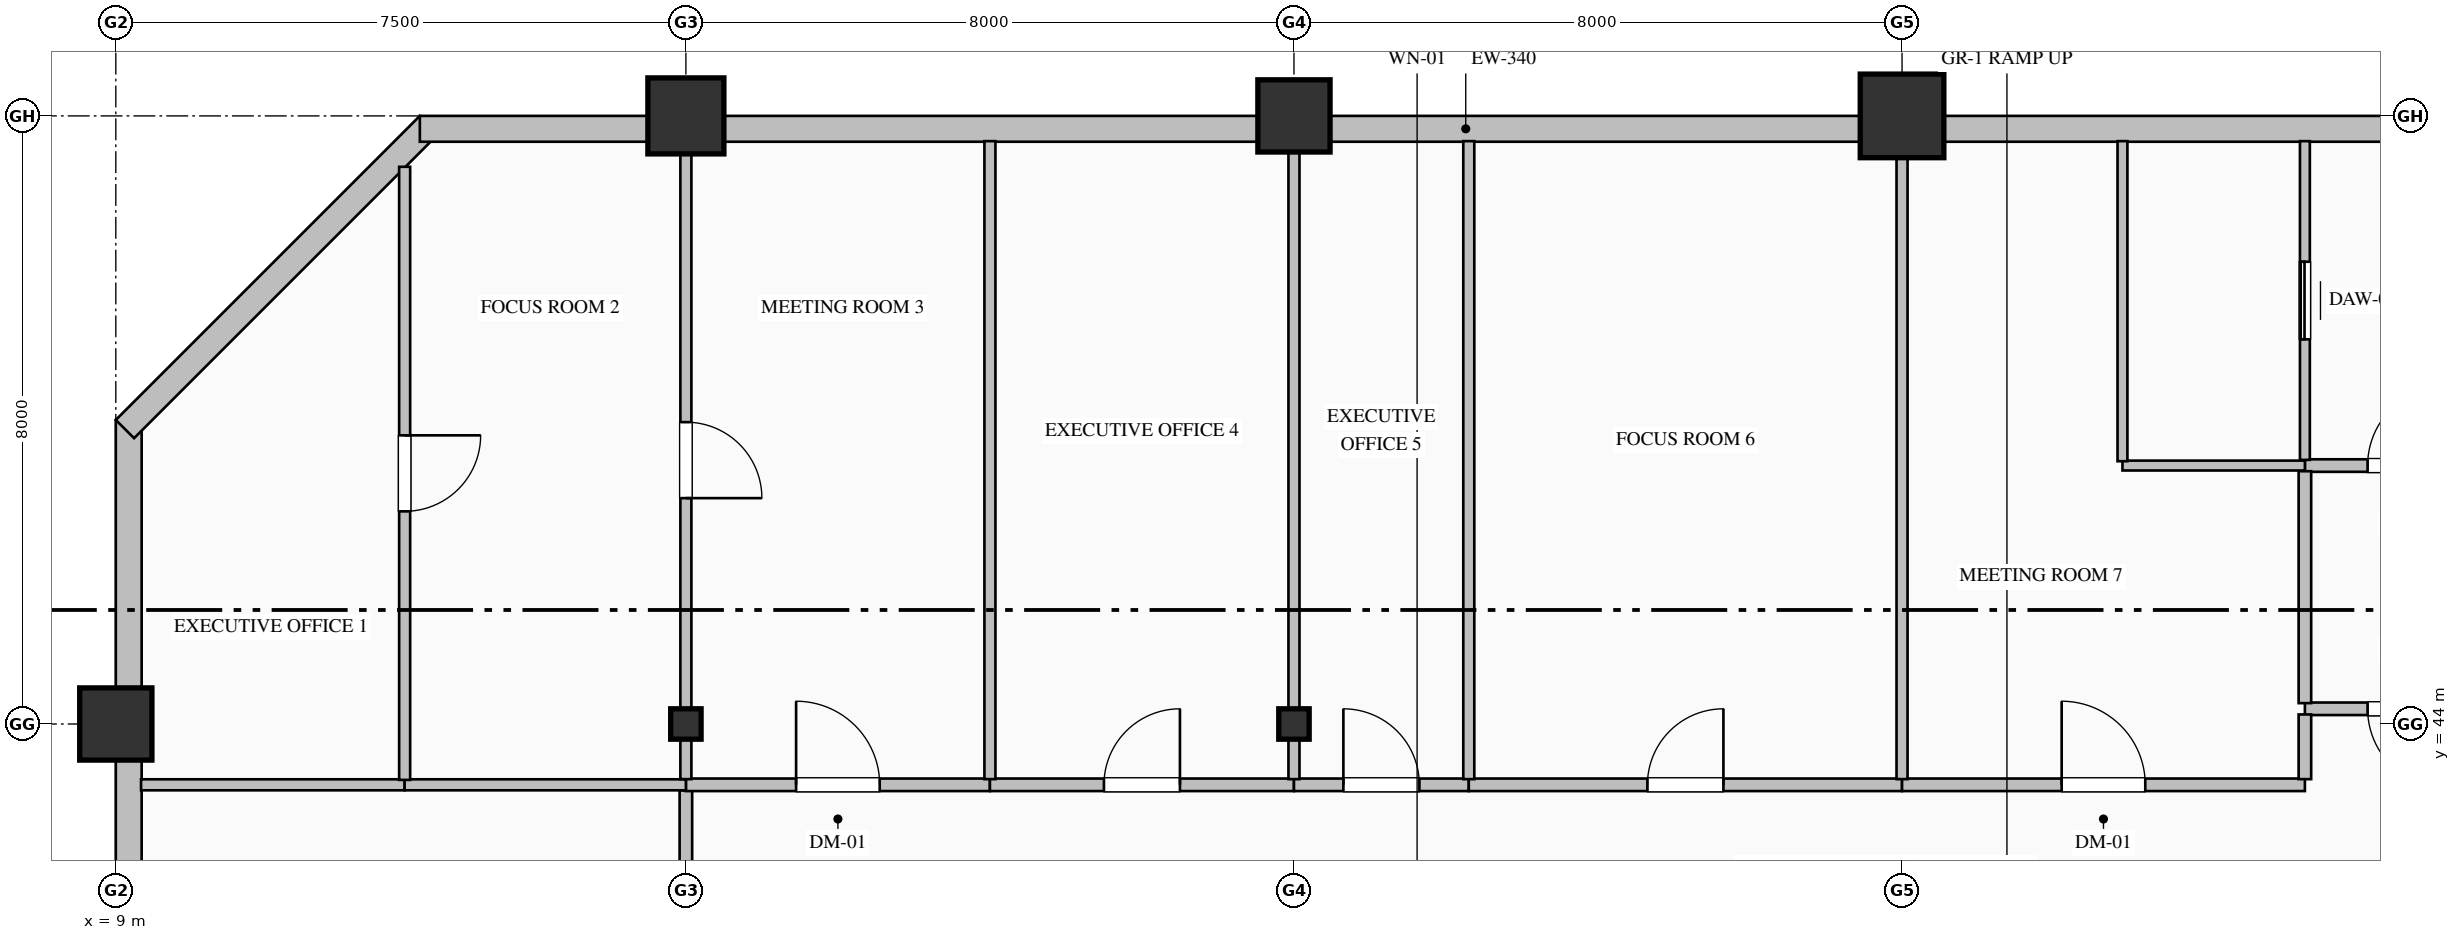
"""IFC4 building model, lengths in metres.
Left out: names, types, materials, properties, quantities, classifications, styles, units other than length and angle.
Written with IfcOpenShell. Run it as: python <this file> out.ifc"""

import sys

from ifc_helpers import new_model, si_unit, direction, frame, frame_2d, origin, origin_2d, place, context, subcontext, project, spatial, rectangle, hollow_rectangle, hollow_circle, i_section, extrude, element, fill, save


model = new_model("IFC4")
c1 = context("Model", 3, precision=1e-05, world=origin(), true_north=direction((0.0, 1.0)))
c2 = subcontext(c1, "Body", "Model", "MODEL_VIEW")
j1 = project(units=[si_unit("LENGTHUNIT", "METRE"), si_unit("PLANEANGLEUNIT", "RADIAN")], contexts=[c1])
p1 = place(None, origin())
s1 = spatial("IfcSite", under=j1, at=p1, CompositionType="ELEMENT")
p2 = place(p1, origin())
s2 = spatial("IfcBuilding", under=s1, at=p2, CompositionType="ELEMENT")
p3 = place(p2, frame((0.0, 0.0, 119.0)))
s3 = spatial("IfcBuildingStorey", under=s2, at=p3, CompositionType="ELEMENT", Elevation=119.0)
p4 = place(p3, frame((9.0, 44.0, 0.0), z_axis=(0.0, 0.0, 1.0), x_axis=(1.0, 0.0, 0.0)))
e1 = element("IfcColumn", 1, at=p4, inside=s3, PredefinedType="COLUMN", context=c2, shape_type="SweptSolid", body=[
    extrude(hollow_rectangle(XDim=0.95, YDim=0.95, WallThickness=0.036, at=origin_2d()), origin(), (0.0, 0.0, 1.0), 4.0),
])
p5 = place(p3, frame((16.5, 44.0, 0.0), z_axis=(0.0, 0.0, 1.0), x_axis=(1.0, 0.0, 0.0)))
e2 = element("IfcColumn", 2, at=p5, inside=s3, PredefinedType="COLUMN", context=c2, shape_type="SweptSolid", body=[
    extrude(i_section(OverallWidth=0.4, OverallDepth=0.4, WebThickness=0.013, FlangeThickness=0.021, FilletRadius=0.022, at=origin_2d()), origin(), (0.0, 0.0, 1.0), 4.0),
])
p6 = place(p3, frame((16.5, 52.0, 0.0), z_axis=(0.0, 0.0, 1.0), x_axis=(1.0, 0.0, 0.0)))
e3 = element("IfcColumn", 3, at=p6, inside=s3, PredefinedType="COLUMN", context=c2, shape_type="SweptSolid", body=[
    extrude(hollow_circle(Radius=0.5, WallThickness=0.036, at=origin_2d()), origin(), (0.0, 0.0, 1.0), 4.0),
])
p7 = place(p3, frame((24.5, 44.0, 0.0), z_axis=(0.0, 0.0, 1.0), x_axis=(1.0, 0.0, 0.0)))
e4 = element("IfcColumn", 4, at=p7, inside=s3, PredefinedType="COLUMN", context=c2, shape_type="SweptSolid", body=[
    extrude(i_section(OverallWidth=0.4, OverallDepth=0.4, WebThickness=0.013, FlangeThickness=0.021, FilletRadius=0.022, at=origin_2d()), origin(), (0.0, 0.0, 1.0), 4.0),
])
p8 = place(p3, frame((24.5, 52.0, 0.0), z_axis=(0.0, 0.0, 1.0), x_axis=(1.0, 0.0, 0.0)))
e5 = element("IfcColumn", 5, at=p8, inside=s3, PredefinedType="COLUMN", context=c2, shape_type="SweptSolid", body=[
    extrude(hollow_rectangle(XDim=0.95, YDim=0.95, WallThickness=0.036, at=origin_2d()), origin(), (0.0, 0.0, 1.0), 4.0),
])
p9 = place(p3, frame((32.5, 52.0, 0.0), z_axis=(0.0, 0.0, 1.0), x_axis=(1.0, 0.0, 0.0)))
e6 = element("IfcColumn", 6, at=p9, inside=s3, PredefinedType="COLUMN", context=c2, shape_type="SweptSolid", body=[
    extrude(hollow_rectangle(XDim=1.1, YDim=1.1, WallThickness=0.04, at=origin_2d()), origin(), (0.0, 0.0, 1.0), 4.0),
])
p10 = place(p3, frame((9.17, 32.0, 0.0), z_axis=(0.0, 0.0, 1.0), x_axis=(0.0, 1.0, 0.0)))
e7 = element("IfcWall", 7, at=p10, inside=s3, PredefinedType="SOLIDWALL", context=c2, shape_type="SweptSolid", body=[
    extrude(rectangle(XDim=16.0, YDim=0.34, at=frame_2d((8.0, 0.0))), origin(), (0.0, 0.0, 1.0), 3.265),
])
p11 = place(p10, frame((6.6, 0.0, 0.7)))
e8 = element("IfcOpeningElement", 8, at=p11, cuts=e7, PredefinedType="OPENING", context=c2, shape_type="SweptSolid", body=[
    extrude(rectangle(XDim=1.2, YDim=1.85, at=frame_2d((0.6, 0.925))), frame((0.0, 0.18, 0.0), z_axis=(0.0, -1.0, 0.0), x_axis=(1.0, 0.0, 0.0)), (0.0, 0.0, 1.0), 0.36),
])
p12 = place(p3, frame((9.12, 47.88, 0.0), z_axis=(0.0, 0.0, 1.0), x_axis=(0.707106781187, 0.707106781187, 0.0)))
e9 = element("IfcWall", 9, at=p12, inside=s3, PredefinedType="SOLIDWALL", context=c2, shape_type="SweptSolid", body=[
    extrude(rectangle(XDim=5.657, YDim=0.34, at=frame_2d((2.828, 0.0))), origin(), (0.0, 0.0, 1.0), 3.765),
])
p13 = place(p3, frame((13.0, 51.83, 0.0), z_axis=(0.0, 0.0, 1.0), x_axis=(1.0, 0.0, 0.0)))
e10 = element("IfcWall", 10, at=p13, inside=s3, PredefinedType="SOLIDWALL", context=c2, shape_type="SweptSolid", body=[
    extrude(rectangle(XDim=27.52, YDim=0.34, at=frame_2d((13.76, 0.0))), origin(), (0.0, 0.0, 1.0), 3.265),
])
p14 = place(p3, frame((37.8, 47.4, 0.0), z_axis=(0.0, 0.0, 1.0), x_axis=(1.0, 0.0, 0.0)))
e11 = element("IfcWall", 11, at=p14, inside=s3, PredefinedType="PARTITIONING", context=c2, shape_type="SweptSolid", body=[
    extrude(rectangle(XDim=2.7, YDim=0.165, at=frame_2d((1.35, 0.0))), origin(), (0.0, 0.0, 1.0), 3.765),
])
p15 = place(p14, frame((0.825, 0.0, 0.0)))
e12 = element("IfcOpeningElement", 12, at=p15, cuts=e11, PredefinedType="OPENING", context=c2, shape_type="SweptSolid", body=[
    extrude(rectangle(XDim=1.05, YDim=2.15, at=frame_2d((0.525, 1.075))), frame((0.0, 0.093, 0.0), z_axis=(0.0, -1.0, 0.0), x_axis=(1.0, 0.0, 0.0)), (0.0, 0.0, 1.0), 0.185),
])
p16 = place(p3, frame((40.5, 44.2, 0.0), z_axis=(0.0, 0.0, 1.0), x_axis=(-1.0, 0.0, 0.0)))
e13 = element("IfcWall", 13, at=p16, inside=s3, PredefinedType="PARTITIONING", context=c2, shape_type="SweptSolid", body=[
    extrude(rectangle(XDim=2.7, YDim=0.165, at=frame_2d((1.35, 0.0))), origin(), (0.0, 0.0, 1.0), 3.765),
])
p17 = place(p16, frame((0.825, 0.0, 0.0)))
e14 = element("IfcOpeningElement", 14, at=p17, cuts=e13, PredefinedType="OPENING", context=c2, shape_type="SweptSolid", body=[
    extrude(rectangle(XDim=1.05, YDim=2.15, at=frame_2d((0.525, 1.075))), frame((0.0, 0.093, 0.0), z_axis=(0.0, -1.0, 0.0), x_axis=(1.0, 0.0, 0.0)), (0.0, 0.0, 1.0), 0.185),
])
p18 = place(p3, frame((37.8, 44.274, 0.0), z_axis=(0.0, 0.0, 1.0), x_axis=(0.0, 1.0, 0.0)))
e15 = element("IfcWall", 15, at=p18, inside=s3, PredefinedType="PARTITIONING", context=c2, shape_type="SweptSolid", body=[
    extrude(rectangle(XDim=3.051, YDim=0.165, at=frame_2d((1.525, 0.0))), origin(), (0.0, 0.0, 1.0), 3.765),
])
p19 = place(p3, frame((37.8, 47.475, 0.0), z_axis=(0.0, 0.0, 1.0), x_axis=(0.0, 1.0, 0.0)))
e16 = element("IfcWall", 16, at=p19, inside=s3, PredefinedType="PARTITIONING", context=c2, shape_type="SweptSolid", body=[
    extrude(rectangle(XDim=4.193, YDim=0.13, at=frame_2d((2.097, 0.0))), origin(), (0.0, 0.0, 1.0), 3.765),
])
p20 = place(p19, frame((1.587, 0.0, 0.0)))
e17 = element("IfcOpeningElement", 17, at=p20, cuts=e16, PredefinedType="OPENING", context=c2, shape_type="SweptSolid", body=[
    extrude(rectangle(XDim=1.02, YDim=2.15, at=frame_2d((0.51, 1.075))), frame((0.0, 0.075, 0.0), z_axis=(0.0, -1.0, 0.0), x_axis=(1.0, 0.0, 0.0)), (0.0, 0.0, 1.0), 0.15),
])
p21 = place(p3, frame((37.8, 47.4, 0.0), z_axis=(0.0, 0.0, 1.0), x_axis=(-1.0, 0.0, 0.0)))
e18 = element("IfcWall", 18, at=p21, inside=s3, PredefinedType="PARTITIONING", context=c2, shape_type="SweptSolid", body=[
    extrude(rectangle(XDim=2.4, YDim=0.13, at=frame_2d((1.2, 0.0))), origin(), (0.0, 0.0, 1.0), 3.765),
])
p22 = place(p3, frame((35.4, 47.457, 0.0), z_axis=(0.0, 0.0, 1.0), x_axis=(0.0, 1.0, 0.0)))
e19 = element("IfcWall", 19, at=p22, inside=s3, PredefinedType="PARTITIONING", context=c2, shape_type="SweptSolid", body=[
    extrude(rectangle(XDim=4.211, YDim=0.13, at=frame_2d((2.105, 0.0))), origin(), (0.0, 0.0, 1.0), 3.765),
])
p23 = place(p3, frame((16.5, 41.0, 0.0), z_axis=(0.0, 0.0, 1.0), x_axis=(0.0, 1.0, 0.0)))
e20 = element("IfcWall", 20, at=p23, inside=s3, PredefinedType="PARTITIONING", context=c2, shape_type="SweptSolid", body=[
    extrude(rectangle(XDim=2.125, YDim=0.165, at=frame_2d((1.063, 0.0))), origin(), (0.0, 0.0, 1.0), 3.157),
])
p24 = place(p3, frame((16.5, 43.2, 0.0), z_axis=(0.0, 0.0, 1.0), x_axis=(1.0, 0.0, 0.0)))
e21 = element("IfcWall", 21, at=p24, inside=s3, PredefinedType="PARTITIONING", context=c2, shape_type="SweptSolid", body=[
    extrude(rectangle(XDim=4.0, YDim=0.165, at=frame_2d((2.0, 0.0))), origin(), (0.0, 0.0, 1.0), 3.765),
])
p25 = place(p24, frame((1.45, 0.0, 0.0)))
e22 = element("IfcOpeningElement", 22, at=p25, cuts=e21, PredefinedType="OPENING", context=c2, shape_type="SweptSolid", body=[
    extrude(rectangle(XDim=1.1, YDim=2.2, at=frame_2d((0.55, 1.1))), frame((0.0, 0.093, 0.0), z_axis=(0.0, -1.0, 0.0), x_axis=(1.0, 0.0, 0.0)), (0.0, 0.0, 1.0), 0.185),
])
p26 = place(p3, frame((20.5, 43.2, 0.0), z_axis=(0.0, 0.0, 1.0), x_axis=(1.0, 0.0, 0.0)))
e23 = element("IfcWall", 23, at=p26, inside=s3, PredefinedType="PARTITIONING", context=c2, shape_type="SweptSolid", body=[
    extrude(rectangle(XDim=4.0, YDim=0.165, at=frame_2d((2.0, 0.0))), origin(), (0.0, 0.0, 1.0), 3.765),
])
p27 = place(p26, frame((1.5, 0.0, 0.0)))
e24 = element("IfcOpeningElement", 24, at=p27, cuts=e23, PredefinedType="OPENING", context=c2, shape_type="SweptSolid", body=[
    extrude(rectangle(XDim=1.0, YDim=2.15, at=frame_2d((0.5, 1.075))), frame((0.0, 0.093, 0.0), z_axis=(0.0, -1.0, 0.0), x_axis=(1.0, 0.0, 0.0)), (0.0, 0.0, 1.0), 0.185),
])
p28 = place(p3, frame((24.5, 43.2, 0.0), z_axis=(0.0, 0.0, 1.0), x_axis=(1.0, 0.0, 0.0)))
e25 = element("IfcWall", 25, at=p28, inside=s3, PredefinedType="PARTITIONING", context=c2, shape_type="SweptSolid", body=[
    extrude(rectangle(XDim=2.3, YDim=0.165, at=frame_2d((1.15, 0.0))), origin(), (0.0, 0.0, 1.0), 3.765),
])
p29 = place(p28, frame((0.65, 0.0, 0.0)))
e26 = element("IfcOpeningElement", 26, at=p29, cuts=e25, PredefinedType="OPENING", context=c2, shape_type="SweptSolid", body=[
    extrude(rectangle(XDim=1.0, YDim=2.15, at=frame_2d((0.5, 1.075))), frame((0.0, 0.093, 0.0), z_axis=(0.0, -1.0, 0.0), x_axis=(1.0, 0.0, 0.0)), (0.0, 0.0, 1.0), 0.185),
])
p30 = place(p3, frame((26.8, 43.2, 0.0), z_axis=(0.0, 0.0, 1.0), x_axis=(1.0, 0.0, 0.0)))
e27 = element("IfcWall", 27, at=p30, inside=s3, PredefinedType="PARTITIONING", context=c2, shape_type="SweptSolid", body=[
    extrude(rectangle(XDim=5.7, YDim=0.165, at=frame_2d((2.85, 0.0))), origin(), (0.0, 0.0, 1.0), 3.765),
])
p31 = place(p30, frame((2.35, 0.0, 0.0)))
e28 = element("IfcOpeningElement", 28, at=p31, cuts=e27, PredefinedType="OPENING", context=c2, shape_type="SweptSolid", body=[
    extrude(rectangle(XDim=1.0, YDim=2.15, at=frame_2d((0.5, 1.075))), frame((0.0, 0.093, 0.0), z_axis=(0.0, -1.0, 0.0), x_axis=(1.0, 0.0, 0.0)), (0.0, 0.0, 1.0), 0.185),
])
p32 = place(p3, frame((32.5, 43.2, 0.0), z_axis=(0.0, 0.0, 1.0), x_axis=(1.0, 0.0, 0.0)))
e29 = element("IfcWall", 29, at=p32, inside=s3, PredefinedType="PARTITIONING", context=c2, shape_type="SweptSolid", body=[
    extrude(rectangle(XDim=5.3, YDim=0.165, at=frame_2d((2.65, 0.0))), origin(), (0.0, 0.0, 1.0), 3.765),
])
p33 = place(p32, frame((2.1, 0.0, 0.0)))
e30 = element("IfcOpeningElement", 30, at=p33, cuts=e29, PredefinedType="OPENING", context=c2, shape_type="SweptSolid", body=[
    extrude(rectangle(XDim=1.1, YDim=2.2, at=frame_2d((0.55, 1.1))), frame((0.0, 0.093, 0.0), z_axis=(0.0, -1.0, 0.0), x_axis=(1.0, 0.0, 0.0)), (0.0, 0.0, 1.0), 0.185),
])
p34 = place(p3, frame((37.8, 43.274, 0.0), z_axis=(0.0, 0.0, 1.0), x_axis=(0.0, 1.0, 0.0)))
e31 = element("IfcWall", 31, at=p34, inside=s3, PredefinedType="PARTITIONING", context=c2, shape_type="SweptSolid", body=[
    extrude(rectangle(XDim=0.851, YDim=0.165, at=frame_2d((0.426, 0.0))), origin(), (0.0, 0.0, 1.0), 3.765),
])
p35 = place(p3, frame((9.332, 43.2, 0.0), z_axis=(0.0, 0.0, 1.0), x_axis=(1.0, 0.0, 0.0)))
e32 = element("IfcWall", 32, at=p35, inside=s3, PredefinedType="PARTITIONING", context=c2, shape_type="SweptSolid", body=[
    extrude(rectangle(XDim=3.468, YDim=0.145, at=frame_2d((1.734, 0.0))), origin(), (0.0, 0.0, 1.0), 3.765),
])
p36 = place(p3, frame((12.8, 43.2, 0.0), z_axis=(0.0, 0.0, 1.0), x_axis=(1.0, 0.0, 0.0)))
e33 = element("IfcWall", 33, at=p36, inside=s3, PredefinedType="PARTITIONING", context=c2, shape_type="SweptSolid", body=[
    extrude(rectangle(XDim=3.7, YDim=0.145, at=frame_2d((1.85, 0.0))), origin(), (0.0, 0.0, 1.0), 3.765),
])
p37 = place(p3, frame((12.8, 51.331, 0.0), z_axis=(0.0, 0.0, 1.0), x_axis=(0.0, -1.0, 0.0)))
e34 = element("IfcWall", 34, at=p37, inside=s3, PredefinedType="PARTITIONING", context=c2, shape_type="SweptSolid", body=[
    extrude(rectangle(XDim=8.066, YDim=0.145, at=frame_2d((4.033, 0.0))), origin(), (0.0, 0.0, 1.0), 3.765),
])
p38 = place(p37, frame((3.533, 0.0, 0.0)))
e35 = element("IfcOpeningElement", 35, at=p38, cuts=e34, PredefinedType="OPENING", context=c2, shape_type="SweptSolid", body=[
    extrude(rectangle(XDim=1.0, YDim=2.15, at=frame_2d((0.5, 1.075))), frame((0.0, 0.083, 0.0), z_axis=(0.0, -1.0, 0.0), x_axis=(1.0, 0.0, 0.0)), (0.0, 0.0, 1.0), 0.165),
])
p39 = place(p3, frame((16.5, 51.668, 0.0), z_axis=(0.0, 0.0, 1.0), x_axis=(0.0, -1.0, 0.0)))
e36 = element("IfcWall", 36, at=p39, inside=s3, PredefinedType="PARTITIONING", context=c2, shape_type="SweptSolid", body=[
    extrude(rectangle(XDim=8.394, YDim=0.145, at=frame_2d((4.197, 0.0))), origin(), (0.0, 0.0, 1.0), 3.157),
])
p40 = place(p39, frame((3.697, 0.0, 0.0)))
e37 = element("IfcOpeningElement", 37, at=p40, cuts=e36, PredefinedType="OPENING", context=c2, shape_type="SweptSolid", body=[
    extrude(rectangle(XDim=1.0, YDim=2.15, at=frame_2d((0.5, 1.075))), frame((0.0, 0.083, 0.0), z_axis=(0.0, -1.0, 0.0), x_axis=(1.0, 0.0, 0.0)), (0.0, 0.0, 1.0), 0.165),
])
p41 = place(p3, frame((20.5, 51.668, 0.0), z_axis=(0.0, 0.0, 1.0), x_axis=(0.0, -1.0, 0.0)))
e38 = element("IfcWall", 38, at=p41, inside=s3, PredefinedType="PARTITIONING", context=c2, shape_type="SweptSolid", body=[
    extrude(rectangle(XDim=8.394, YDim=0.145, at=frame_2d((4.197, 0.0))), origin(), (0.0, 0.0, 1.0), 3.765),
])
p42 = place(p3, frame((24.5, 51.668, 0.0), z_axis=(0.0, 0.0, 1.0), x_axis=(0.0, -1.0, 0.0)))
e39 = element("IfcWall", 39, at=p42, inside=s3, PredefinedType="PARTITIONING", context=c2, shape_type="SweptSolid", body=[
    extrude(rectangle(XDim=8.394, YDim=0.145, at=frame_2d((4.197, 0.0))), origin(), (0.0, 0.0, 1.0), 3.157),
])
for number, where, z_axis, x_axis in (
    (40, (26.8, 51.668, 0.0), (0.0, 0.0, 1.0), (0.0, -1.0, 0.0)),
    (41, (32.5, 51.668, 0.0), (0.0, 0.0, 1.0), (0.0, -1.0, 0.0)),
):
    element("IfcWall", number, at=place(p3, frame(where, z_axis=z_axis, x_axis=x_axis)), inside=s3, PredefinedType="PARTITIONING", context=c2, shape_type="SweptSolid", body=[
        extrude(rectangle(XDim=8.394, YDim=0.145, at=frame_2d((4.197, 0.0))), origin(), (0.0, 0.0, 1.0), 3.765),
    ])
p43 = place(p15, origin())
e42 = element("IfcDoor", 42, at=p43, inside=s3, OperationType="SINGLE_SWING_RIGHT", PredefinedType="DOOR", context=c2, shape_type="SweptSolid", body=[
    extrude(rectangle(XDim=1.05, YDim=2.15, at=frame_2d((0.525, 1.075))), frame((0.0, 0.025, 0.0), z_axis=(0.0, -1.0, 0.0), x_axis=(1.0, 0.0, 0.0)), (0.0, 0.0, 1.0), 0.05),
])
fill(e12, e42)
p44 = place(p17, origin())
e43 = element("IfcDoor", 43, at=p44, inside=s3, OperationType="SINGLE_SWING_LEFT", PredefinedType="DOOR", context=c2, shape_type="SweptSolid", body=[
    extrude(rectangle(XDim=1.05, YDim=2.15, at=frame_2d((0.525, 1.075))), frame((0.0, 0.025, 0.0), z_axis=(0.0, -1.0, 0.0), x_axis=(1.0, 0.0, 0.0)), (0.0, 0.0, 1.0), 0.05),
])
fill(e14, e43)
p45 = place(p20, origin())
e44 = element("IfcDoor", 44, at=p45, inside=s3, OperationType="SLIDING_TO_LEFT", PredefinedType="DOOR", context=c2, shape_type="SweptSolid", body=[
    extrude(rectangle(XDim=1.02, YDim=2.15, at=frame_2d((0.51, 1.075))), frame((0.0, 0.025, 0.0), z_axis=(0.0, -1.0, 0.0), x_axis=(1.0, 0.0, 0.0)), (0.0, 0.0, 1.0), 0.05),
])
fill(e17, e44)
p46 = place(p38, origin())
e45 = element("IfcDoor", 45, at=p46, inside=s3, OperationType="SINGLE_SWING_LEFT", PredefinedType="DOOR", context=c2, shape_type="SweptSolid", body=[
    extrude(rectangle(XDim=1.0, YDim=2.15, at=frame_2d((0.5, 1.075))), frame((0.0, 0.025, 0.0), z_axis=(0.0, -1.0, 0.0), x_axis=(1.0, 0.0, 0.0)), (0.0, 0.0, 1.0), 0.05),
])
fill(e35, e45)
p47 = place(p40, origin())
e46 = element("IfcDoor", 46, at=p47, inside=s3, OperationType="SINGLE_SWING_RIGHT", PredefinedType="DOOR", context=c2, shape_type="SweptSolid", body=[
    extrude(rectangle(XDim=1.0, YDim=2.15, at=frame_2d((0.5, 1.075))), frame((0.0, 0.025, 0.0), z_axis=(0.0, -1.0, 0.0), x_axis=(1.0, 0.0, 0.0)), (0.0, 0.0, 1.0), 0.05),
])
fill(e37, e46)
p48 = place(p25, origin())
e47 = element("IfcDoor", 47, at=p48, inside=s3, OperationType="SINGLE_SWING_LEFT", PredefinedType="DOOR", context=c2, shape_type="SweptSolid", body=[
    extrude(rectangle(XDim=1.1, YDim=2.2, at=frame_2d((0.55, 1.1))), frame((0.0, 0.025, 0.0), z_axis=(0.0, -1.0, 0.0), x_axis=(1.0, 0.0, 0.0)), (0.0, 0.0, 1.0), 0.05),
])
fill(e22, e47)
p49 = place(p27, origin())
e48 = element("IfcDoor", 48, at=p49, inside=s3, OperationType="SINGLE_SWING_RIGHT", PredefinedType="DOOR", context=c2, shape_type="SweptSolid", body=[
    extrude(rectangle(XDim=1.0, YDim=2.15, at=frame_2d((0.5, 1.075))), frame((0.0, 0.025, 0.0), z_axis=(0.0, -1.0, 0.0), x_axis=(1.0, 0.0, 0.0)), (0.0, 0.0, 1.0), 0.05),
])
fill(e24, e48)
p50 = place(p29, origin())
e49 = element("IfcDoor", 49, at=p50, inside=s3, OperationType="SINGLE_SWING_LEFT", PredefinedType="DOOR", context=c2, shape_type="SweptSolid", body=[
    extrude(rectangle(XDim=1.0, YDim=2.15, at=frame_2d((0.5, 1.075))), frame((0.0, 0.025, 0.0), z_axis=(0.0, -1.0, 0.0), x_axis=(1.0, 0.0, 0.0)), (0.0, 0.0, 1.0), 0.05),
])
fill(e26, e49)
p51 = place(p31, origin())
e50 = element("IfcDoor", 50, at=p51, inside=s3, OperationType="SINGLE_SWING_RIGHT", PredefinedType="DOOR", context=c2, shape_type="SweptSolid", body=[
    extrude(rectangle(XDim=1.0, YDim=2.15, at=frame_2d((0.5, 1.075))), frame((0.0, 0.025, 0.0), z_axis=(0.0, -1.0, 0.0), x_axis=(1.0, 0.0, 0.0)), (0.0, 0.0, 1.0), 0.05),
])
fill(e28, e50)
p52 = place(p33, origin())
e51 = element("IfcDoor", 51, at=p52, inside=s3, OperationType="SINGLE_SWING_LEFT", PredefinedType="DOOR", context=c2, shape_type="SweptSolid", body=[
    extrude(rectangle(XDim=1.1, YDim=2.2, at=frame_2d((0.55, 1.1))), frame((0.0, 0.025, 0.0), z_axis=(0.0, -1.0, 0.0), x_axis=(1.0, 0.0, 0.0)), (0.0, 0.0, 1.0), 0.05),
])
fill(e30, e51)
save(model, sys.argv[1])
